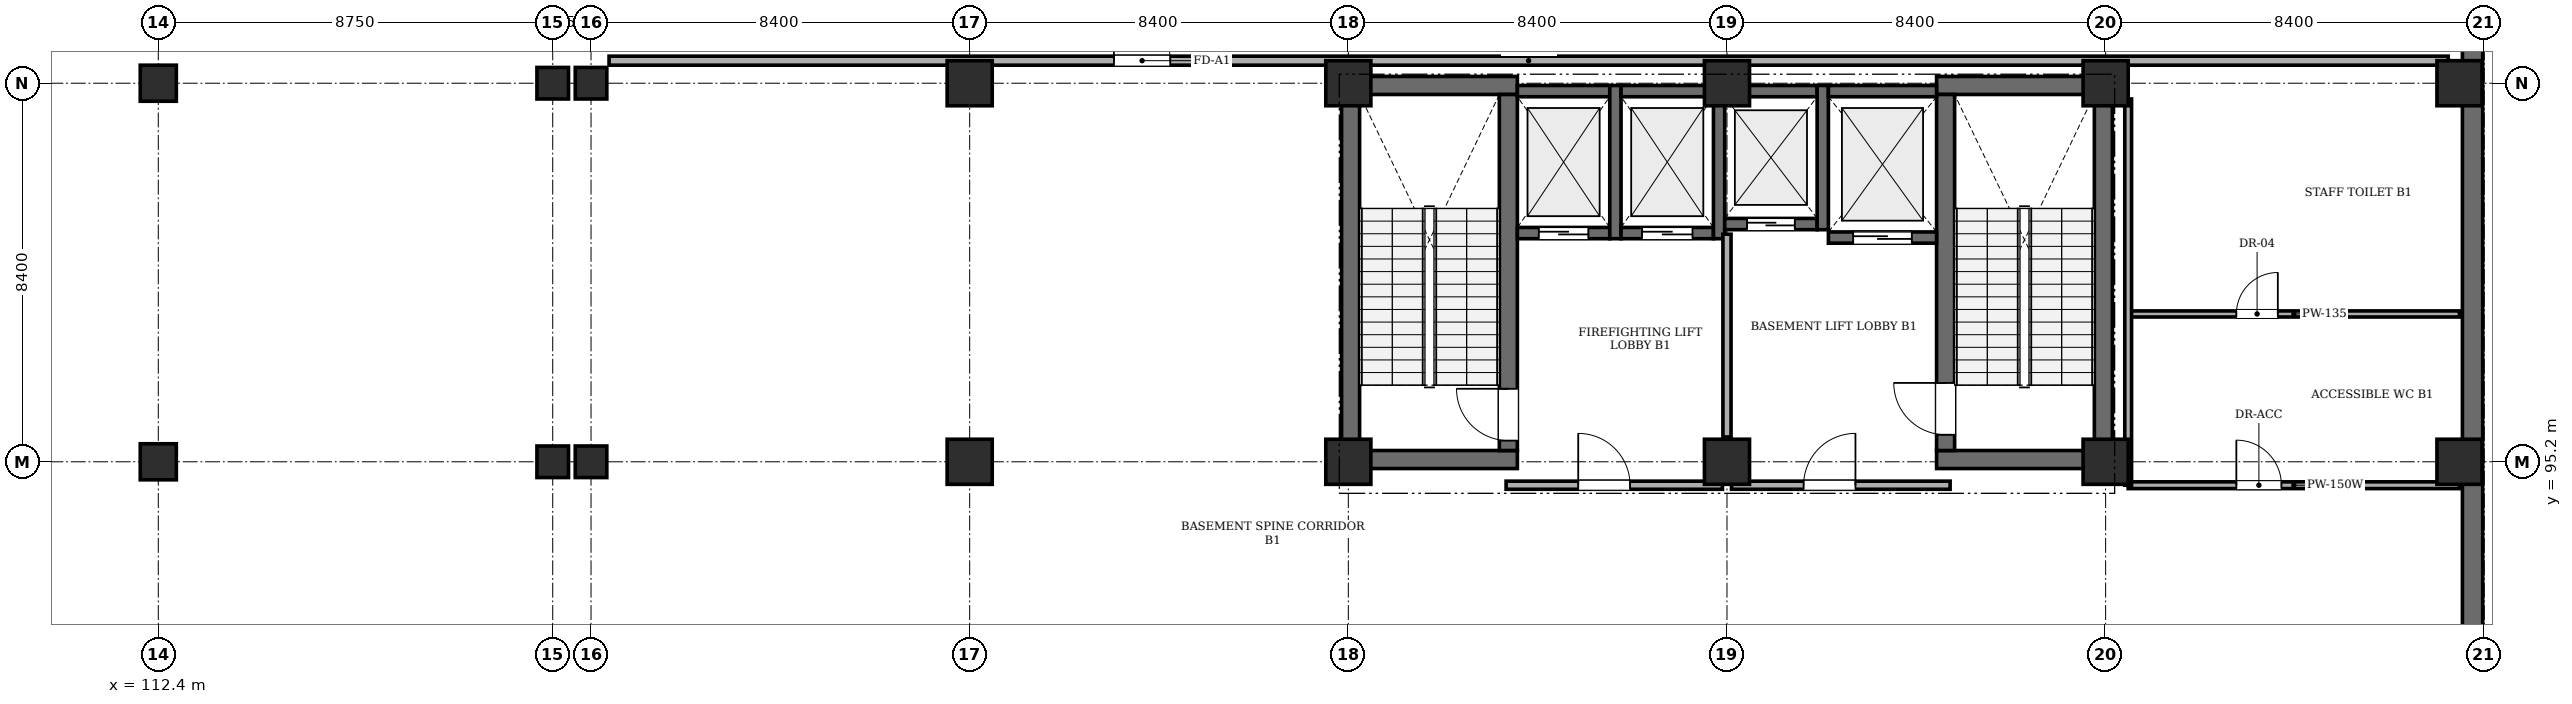
"""IFC4 building model, lengths in metres.
Left out: names, types, materials, properties, quantities, classifications, styles, units other than length and angle.
Written with IfcOpenShell. Run it as: python <this file> out.ifc"""

import sys

from ifc_helpers import new_model, si_unit, direction, frame, frame_2d, origin, origin_2d, place, context, subcontext, project, spatial, rectangle, extrude, element, fill, save


model = new_model("IFC4")
c1 = context("Model", 3, precision=1e-05, world=origin(), true_north=direction((0.0, 1.0)))
c2 = subcontext(c1, "Body", "Model", "MODEL_VIEW")
j1 = project(units=[si_unit("LENGTHUNIT", "METRE"), si_unit("PLANEANGLEUNIT", "RADIAN")], contexts=[c1])
p1 = place(None, origin())
s1 = spatial("IfcSite", under=j1, at=p1, CompositionType="ELEMENT")
p2 = place(p1, origin())
s2 = spatial("IfcBuilding", under=s1, at=p2, CompositionType="ELEMENT")
p3 = place(p2, frame((0.0, 0.0, -4.8)))
s3 = spatial("IfcBuildingStorey", under=s2, at=p3, CompositionType="ELEMENT", Elevation=-4.8)
for number, where, z_axis, x_axis in (
    (1, (112.4, 95.2, 0.0), (0.0, 0.0, 1.0), (1.0, 0.0, 0.0)),
    (2, (112.4, 103.6, 0.0), (0.0, 0.0, 1.0), (1.0, 0.0, 0.0)),
):
    element("IfcColumn", number, at=place(p3, frame(where, z_axis=z_axis, x_axis=x_axis)), inside=s3, PredefinedType="COLUMN", context=c2, shape_type="SweptSolid", body=[
        extrude(rectangle(XDim=0.8, YDim=0.8, at=origin_2d()), origin(), (0.0, 0.0, 1.0), 4.395),
    ])
for number, where, z_axis, x_axis in (
    (3, (121.15, 95.2, 0.0), (0.0, 0.0, 1.0), (1.0, 0.0, 0.0)),
    (4, (121.15, 103.6, 0.0), (0.0, 0.0, 1.0), (1.0, 0.0, 0.0)),
    (5, (122.0, 95.2, 0.0), (0.0, 0.0, 1.0), (1.0, 0.0, 0.0)),
    (6, (122.0, 103.6, 0.0), (0.0, 0.0, 1.0), (1.0, 0.0, 0.0)),
):
    element("IfcColumn", number, at=place(p3, frame(where, z_axis=z_axis, x_axis=x_axis)), inside=s3, PredefinedType="COLUMN", context=c2, shape_type="SweptSolid", body=[
        extrude(rectangle(XDim=0.7, YDim=0.7, at=origin_2d()), origin(), (0.0, 0.0, 1.0), 4.395),
    ])
for number, where, z_axis, x_axis in (
    (7, (130.4, 95.2, 0.0), (0.0, 0.0, 1.0), (1.0, 0.0, 0.0)),
    (8, (130.4, 103.6, 0.0), (0.0, 0.0, 1.0), (1.0, 0.0, 0.0)),
    (9, (138.8, 95.2, 0.0), (0.0, 0.0, 1.0), (1.0, 0.0, 0.0)),
    (10, (138.8, 103.6, 0.0), (0.0, 0.0, 1.0), (1.0, 0.0, 0.0)),
    (11, (147.2, 95.2, 0.0), (0.0, 0.0, 1.0), (1.0, 0.0, 0.0)),
    (12, (147.2, 103.6, 0.0), (0.0, 0.0, 1.0), (1.0, 0.0, 0.0)),
    (13, (155.6, 95.2, 0.0), (0.0, 0.0, 1.0), (1.0, 0.0, 0.0)),
    (14, (155.6, 103.6, 0.0), (0.0, 0.0, 1.0), (1.0, 0.0, 0.0)),
    (15, (163.45, 95.2, 0.0), (0.0, 0.0, 1.0), (1.0, 0.0, 0.0)),
    (16, (163.45, 103.6, 0.0), (0.0, 0.0, 1.0), (1.0, 0.0, 0.0)),
):
    element("IfcColumn", number, at=place(p3, frame(where, z_axis=z_axis, x_axis=x_axis)), inside=s3, PredefinedType="COLUMN", context=c2, shape_type="SweptSolid", body=[
        extrude(rectangle(XDim=1.0, YDim=1.0, at=origin_2d()), origin(), (0.0, 0.0, 1.0), 4.395),
    ])
p4 = place(p3, frame((163.74, 0.26, 0.0), z_axis=(0.0, 0.0, 1.0), x_axis=(0.0, 1.0, 0.0)))
e17 = element("IfcWall", 17, at=p4, inside=s3, PredefinedType="SHEAR", context=c2, shape_type="SweptSolid", body=[
    extrude(rectangle(XDim=111.48, YDim=0.45, at=frame_2d((55.74, 0.0))), origin(), (0.0, 0.0, 1.0), 3.75),
])
for number, where, z_axis, x_axis in (
    (18, (138.65, 95.25, 0.0), (0.0, 0.0, 1.0), (1.0, 0.0, 0.0)),
    (19, (138.65, 103.55, 0.0), (0.0, 0.0, 1.0), (1.0, 0.0, 0.0)),
):
    element("IfcWall", number, at=place(p3, frame(where, z_axis=z_axis, x_axis=x_axis)), inside=s3, PredefinedType="SHEAR", context=c2, shape_type="SweptSolid", body=[
        extrude(rectangle(XDim=3.9, YDim=0.4, at=frame_2d((1.95, 0.0))), origin(), (0.0, 0.0, 1.0), 4.395),
    ])
p5 = place(p3, frame((138.85, 95.45, 0.0), z_axis=(0.0, 0.0, 1.0), x_axis=(0.0, 1.0, 0.0)))
e20 = element("IfcWall", 20, at=p5, inside=s3, PredefinedType="SHEAR", context=c2, shape_type="SweptSolid", body=[
    extrude(rectangle(XDim=7.9, YDim=0.4, at=frame_2d((3.95, 0.0))), origin(), (0.0, 0.0, 1.0), 4.395),
])
p6 = place(p3, frame((142.35, 95.45, 0.0), z_axis=(0.0, 0.0, 1.0), x_axis=(0.0, 1.0, 0.0)))
e21 = element("IfcWall", 21, at=p6, inside=s3, PredefinedType="SHEAR", context=c2, shape_type="SweptSolid", body=[
    extrude(rectangle(XDim=7.9, YDim=0.4, at=frame_2d((3.95, 0.0))), origin(), (0.0, 0.0, 1.0), 4.395),
])
p7 = place(p6, frame((0.22, 0.0, 0.0)))
e22 = element("IfcOpeningElement", 22, at=p7, cuts=e21, PredefinedType="OPENING", context=c2, shape_type="SweptSolid", body=[
    extrude(rectangle(XDim=1.15, YDim=2.15, at=frame_2d((0.575, 1.075))), frame((0.0, 0.21, 0.0), z_axis=(0.0, -1.0, 0.0), x_axis=(1.0, 0.0, 0.0)), (0.0, 0.0, 1.0), 0.42),
])
for number, where, z_axis, x_axis in (
    (23, (151.85, 95.25, 0.0), (0.0, 0.0, 1.0), (1.0, 0.0, 0.0)),
    (24, (151.85, 103.55, 0.0), (0.0, 0.0, 1.0), (1.0, 0.0, 0.0)),
):
    element("IfcWall", number, at=place(p3, frame(where, z_axis=z_axis, x_axis=x_axis)), inside=s3, PredefinedType="SHEAR", context=c2, shape_type="SweptSolid", body=[
        extrude(rectangle(XDim=3.9, YDim=0.4, at=frame_2d((1.95, 0.0))), origin(), (0.0, 0.0, 1.0), 4.395),
    ])
p8 = place(p3, frame((152.05, 95.45, 0.0), z_axis=(0.0, 0.0, 1.0), x_axis=(0.0, 1.0, 0.0)))
e25 = element("IfcWall", 25, at=p8, inside=s3, PredefinedType="SHEAR", context=c2, shape_type="SweptSolid", body=[
    extrude(rectangle(XDim=7.9, YDim=0.4, at=frame_2d((3.95, 0.0))), origin(), (0.0, 0.0, 1.0), 4.395),
])
p9 = place(p8, frame((0.35, 0.0, 0.0)))
e26 = element("IfcOpeningElement", 26, at=p9, cuts=e25, PredefinedType="OPENING", context=c2, shape_type="SweptSolid", body=[
    extrude(rectangle(XDim=1.15, YDim=2.15, at=frame_2d((0.575, 1.075))), frame((0.0, 0.21, 0.0), z_axis=(0.0, -1.0, 0.0), x_axis=(1.0, 0.0, 0.0)), (0.0, 0.0, 1.0), 0.42),
])
p10 = place(p3, frame((155.55, 95.45, 0.0), z_axis=(0.0, 0.0, 1.0), x_axis=(0.0, 1.0, 0.0)))
e27 = element("IfcWall", 27, at=p10, inside=s3, PredefinedType="SHEAR", context=c2, shape_type="SweptSolid", body=[
    extrude(rectangle(XDim=7.9, YDim=0.4, at=frame_2d((3.95, 0.0))), origin(), (0.0, 0.0, 1.0), 4.395),
])
p11 = place(p3, frame((142.55, 100.275, 0.0), z_axis=(0.0, 0.0, 1.0), x_axis=(1.0, 0.0, 0.0)))
e28 = element("IfcWall", 28, at=p11, inside=s3, PredefinedType="SHEAR", context=c2, shape_type="SweptSolid", body=[
    extrude(rectangle(XDim=2.05, YDim=0.25, at=frame_2d((1.025, 0.0))), origin(), (0.0, 0.0, 1.0), 4.395),
])
p12 = place(p11, frame((0.475, 0.0, 0.0)))
e29 = element("IfcOpeningElement", 29, at=p12, cuts=e28, PredefinedType="OPENING", context=c2, shape_type="SweptSolid", body=[
    extrude(rectangle(XDim=1.1, YDim=2.15, at=frame_2d((0.55, 1.075))), frame((0.0, 0.135, 0.0), z_axis=(0.0, -1.0, 0.0), x_axis=(1.0, 0.0, 0.0)), (0.0, 0.0, 1.0), 0.27),
])
p13 = place(p3, frame((142.55, 103.425, 0.0), z_axis=(0.0, 0.0, 1.0), x_axis=(1.0, 0.0, 0.0)))
e30 = element("IfcWall", 30, at=p13, inside=s3, PredefinedType="SHEAR", context=c2, shape_type="SweptSolid", body=[
    extrude(rectangle(XDim=2.05, YDim=0.25, at=frame_2d((1.025, 0.0))), origin(), (0.0, 0.0, 1.0), 4.395),
])
p14 = place(p3, frame((144.725, 100.15, 0.0), z_axis=(0.0, 0.0, 1.0), x_axis=(0.0, 1.0, 0.0)))
e31 = element("IfcWall", 31, at=p14, inside=s3, PredefinedType="SHEAR", context=c2, shape_type="SweptSolid", body=[
    extrude(rectangle(XDim=3.4, YDim=0.25, at=frame_2d((1.7, 0.0))), origin(), (0.0, 0.0, 1.0), 4.395),
])
p15 = place(p3, frame((144.85, 100.275, 0.0), z_axis=(0.0, 0.0, 1.0), x_axis=(1.0, 0.0, 0.0)))
e32 = element("IfcWall", 32, at=p15, inside=s3, PredefinedType="SHEAR", context=c2, shape_type="SweptSolid", body=[
    extrude(rectangle(XDim=2.05, YDim=0.25, at=frame_2d((1.025, 0.0))), origin(), (0.0, 0.0, 1.0), 4.395),
])
p16 = place(p15, frame((0.465, 0.0, 0.0)))
e33 = element("IfcOpeningElement", 33, at=p16, cuts=e32, PredefinedType="OPENING", context=c2, shape_type="SweptSolid", body=[
    extrude(rectangle(XDim=1.12, YDim=2.15, at=frame_2d((0.56, 1.075))), frame((0.0, 0.135, 0.0), z_axis=(0.0, -1.0, 0.0), x_axis=(1.0, 0.0, 0.0)), (0.0, 0.0, 1.0), 0.27),
])
p17 = place(p3, frame((144.85, 103.425, 0.0), z_axis=(0.0, 0.0, 1.0), x_axis=(1.0, 0.0, 0.0)))
e34 = element("IfcWall", 34, at=p17, inside=s3, PredefinedType="SHEAR", context=c2, shape_type="SweptSolid", body=[
    extrude(rectangle(XDim=2.05, YDim=0.25, at=frame_2d((1.025, 0.0))), origin(), (0.0, 0.0, 1.0), 4.395),
])
p18 = place(p3, frame((147.025, 100.15, 0.0), z_axis=(0.0, 0.0, 1.0), x_axis=(0.0, 1.0, 0.0)))
e35 = element("IfcWall", 35, at=p18, inside=s3, PredefinedType="SHEAR", context=c2, shape_type="SweptSolid", body=[
    extrude(rectangle(XDim=3.4, YDim=0.25, at=frame_2d((1.7, 0.0))), origin(), (0.0, 0.0, 1.0), 4.395),
])
p19 = place(p3, frame((147.15, 100.475, 0.0), z_axis=(0.0, 0.0, 1.0), x_axis=(1.0, 0.0, 0.0)))
e36 = element("IfcWall", 36, at=p19, inside=s3, PredefinedType="SHEAR", context=c2, shape_type="SweptSolid", body=[
    extrude(rectangle(XDim=2.05, YDim=0.25, at=frame_2d((1.025, 0.0))), origin(), (0.0, 0.0, 1.0), 4.395),
])
p20 = place(p19, frame((0.495, 0.0, 0.0)))
e37 = element("IfcOpeningElement", 37, at=p20, cuts=e36, PredefinedType="OPENING", context=c2, shape_type="SweptSolid", body=[
    extrude(rectangle(XDim=1.06, YDim=2.15, at=frame_2d((0.53, 1.075))), frame((0.0, 0.135, 0.0), z_axis=(0.0, -1.0, 0.0), x_axis=(1.0, 0.0, 0.0)), (0.0, 0.0, 1.0), 0.27),
])
p21 = place(p3, frame((147.15, 103.425, 0.0), z_axis=(0.0, 0.0, 1.0), x_axis=(1.0, 0.0, 0.0)))
e38 = element("IfcWall", 38, at=p21, inside=s3, PredefinedType="SHEAR", context=c2, shape_type="SweptSolid", body=[
    extrude(rectangle(XDim=2.05, YDim=0.25, at=frame_2d((1.025, 0.0))), origin(), (0.0, 0.0, 1.0), 4.395),
])
p22 = place(p3, frame((149.325, 100.35, 0.0), z_axis=(0.0, 0.0, 1.0), x_axis=(0.0, 1.0, 0.0)))
e39 = element("IfcWall", 39, at=p22, inside=s3, PredefinedType="SHEAR", context=c2, shape_type="SweptSolid", body=[
    extrude(rectangle(XDim=3.2, YDim=0.25, at=frame_2d((1.6, 0.0))), origin(), (0.0, 0.0, 1.0), 4.395),
])
p23 = place(p3, frame((149.45, 100.175, 0.0), z_axis=(0.0, 0.0, 1.0), x_axis=(1.0, 0.0, 0.0)))
e40 = element("IfcWall", 40, at=p23, inside=s3, PredefinedType="SHEAR", context=c2, shape_type="SweptSolid", body=[
    extrude(rectangle(XDim=2.4, YDim=0.25, at=frame_2d((1.2, 0.0))), origin(), (0.0, 0.0, 1.0), 4.395),
])
p24 = place(p23, frame((0.55, 0.0, 0.0)))
e41 = element("IfcOpeningElement", 41, at=p24, cuts=e40, PredefinedType="OPENING", context=c2, shape_type="SweptSolid", body=[
    extrude(rectangle(XDim=1.3, YDim=2.25, at=frame_2d((0.65, 1.125))), frame((0.0, 0.135, 0.0), z_axis=(0.0, -1.0, 0.0), x_axis=(1.0, 0.0, 0.0)), (0.0, 0.0, 1.0), 0.27),
])
p25 = place(p3, frame((149.45, 103.425, 0.0), z_axis=(0.0, 0.0, 1.0), x_axis=(1.0, 0.0, 0.0)))
e42 = element("IfcWall", 42, at=p25, inside=s3, PredefinedType="SHEAR", context=c2, shape_type="SweptSolid", body=[
    extrude(rectangle(XDim=2.4, YDim=0.25, at=frame_2d((1.2, 0.0))), origin(), (0.0, 0.0, 1.0), 4.395),
])
p26 = place(p3, frame((142.3, 94.68, 0.0), z_axis=(0.0, 0.0, 1.0), x_axis=(1.0, 0.0, 0.0)))
e43 = element("IfcWall", 43, at=p26, inside=s3, PredefinedType="STANDARD", context=c2, shape_type="SweptSolid", body=[
    extrude(rectangle(XDim=4.8, YDim=0.18, at=frame_2d((2.4, 0.0))), origin(), (0.0, 0.0, 1.0), 4.395),
])
p27 = place(p26, frame((1.6, 0.0, 0.0)))
e44 = element("IfcOpeningElement", 44, at=p27, cuts=e43, PredefinedType="OPENING", context=c2, shape_type="SweptSolid", body=[
    extrude(rectangle(XDim=1.15, YDim=2.15, at=frame_2d((0.575, 1.075))), frame((0.0, 0.1, 0.0), z_axis=(0.0, -1.0, 0.0), x_axis=(1.0, 0.0, 0.0)), (0.0, 0.0, 1.0), 0.2),
])
p28 = place(p3, frame((147.3, 94.68, 0.0), z_axis=(0.0, 0.0, 1.0), x_axis=(1.0, 0.0, 0.0)))
e45 = element("IfcWall", 45, at=p28, inside=s3, PredefinedType="STANDARD", context=c2, shape_type="SweptSolid", body=[
    extrude(rectangle(XDim=4.85, YDim=0.18, at=frame_2d((2.425, 0.0))), origin(), (0.0, 0.0, 1.0), 4.395),
])
p29 = place(p28, frame((1.6, 0.0, 0.0)))
e46 = element("IfcOpeningElement", 46, at=p29, cuts=e45, PredefinedType="OPENING", context=c2, shape_type="SweptSolid", body=[
    extrude(rectangle(XDim=1.15, YDim=2.15, at=frame_2d((0.575, 1.075))), frame((0.0, 0.1, 0.0), z_axis=(0.0, -1.0, 0.0), x_axis=(1.0, 0.0, 0.0)), (0.0, 0.0, 1.0), 0.2),
])
p30 = place(p3, frame((147.2, 95.75, 0.0), z_axis=(0.0, 0.0, 1.0), x_axis=(0.0, 1.0, 0.0)))
e47 = element("IfcWall", 47, at=p30, inside=s3, PredefinedType="STANDARD", context=c2, shape_type="SweptSolid", body=[
    extrude(rectangle(XDim=4.5, YDim=0.18, at=frame_2d((2.25, 0.0))), origin(), (0.0, 0.0, 1.0), 3.595),
])
p31 = place(p3, frame((156.1, 94.68, 0.0), z_axis=(0.0, 0.0, 1.0), x_axis=(1.0, 0.0, 0.0)))
e48 = element("IfcWall", 48, at=p31, inside=s3, PredefinedType="PARTITIONING", context=c2, shape_type="SweptSolid", body=[
    extrude(rectangle(XDim=7.35, YDim=0.15, at=frame_2d((3.675, 0.0))), origin(), (0.0, 0.0, 1.0), 4.395),
])
p32 = place(p31, frame((2.4, 0.0, 0.0)))
e49 = element("IfcOpeningElement", 49, at=p32, cuts=e48, PredefinedType="OPENING", context=c2, shape_type="SweptSolid", body=[
    extrude(rectangle(XDim=1.0, YDim=2.12, at=frame_2d((0.5, 1.06))), frame((0.0, 0.085, 0.0), z_axis=(0.0, -1.0, 0.0), x_axis=(1.0, 0.0, 0.0)), (0.0, 0.0, 1.0), 0.17),
])
p33 = place(p3, frame((156.1, 98.48, 0.0), z_axis=(0.0, 0.0, 1.0), x_axis=(1.0, 0.0, 0.0)))
e50 = element("IfcWall", 50, at=p33, inside=s3, PredefinedType="PARTITIONING", context=c2, shape_type="SweptSolid", body=[
    extrude(rectangle(XDim=7.35, YDim=0.135, at=frame_2d((3.675, 0.0))), origin(), (0.0, 0.0, 1.0), 4.395),
])
p34 = place(p33, frame((2.4, 0.0, 0.0)))
e51 = element("IfcOpeningElement", 51, at=p34, cuts=e50, PredefinedType="OPENING", context=c2, shape_type="SweptSolid", body=[
    extrude(rectangle(XDim=0.92, YDim=2.1, at=frame_2d((0.46, 1.05))), frame((0.0, 0.077, 0.0), z_axis=(0.0, -1.0, 0.0), x_axis=(1.0, 0.0, 0.0)), (0.0, 0.0, 1.0), 0.155),
])
p35 = place(p3, frame((156.1, 94.68, 0.0), z_axis=(0.0, 0.0, 1.0), x_axis=(0.0, 1.0, 0.0)))
e52 = element("IfcWall", 52, at=p35, inside=s3, PredefinedType="PARTITIONING", context=c2, shape_type="SweptSolid", body=[
    extrude(rectangle(XDim=8.57, YDim=0.15, at=frame_2d((4.285, 0.0))), origin(), (0.0, 0.0, 1.0), 4.395),
])
p36 = place(p3, frame((122.4, 104.1, 0.0), z_axis=(0.0, 0.0, 1.0), x_axis=(1.0, 0.0, 0.0)))
e53 = element("IfcWall", 53, at=p36, inside=s3, PredefinedType="SOLIDWALL", context=c2, shape_type="SweptSolid", body=[
    extrude(rectangle(XDim=40.8, YDim=0.2, at=frame_2d((20.4, 0.0))), origin(), (0.0, 0.0, 1.0), 4.395),
])
p37 = place(p36, frame((11.2, 0.0, 0.0)))
e54 = element("IfcOpeningElement", 54, at=p37, cuts=e53, PredefinedType="OPENING", context=c2, shape_type="SweptSolid", body=[
    extrude(rectangle(XDim=1.25, YDim=2.2, at=frame_2d((0.625, 1.1))), frame((0.0, 0.11, 0.0), z_axis=(0.0, -1.0, 0.0), x_axis=(1.0, 0.0, 0.0)), (0.0, 0.0, 1.0), 0.22),
])
p38 = place(p27, origin())
e55 = element("IfcDoor", 55, at=p38, inside=s3, OperationType="SINGLE_SWING_LEFT", PredefinedType="DOOR", context=c2, shape_type="SweptSolid", body=[
    extrude(rectangle(XDim=1.15, YDim=2.15, at=frame_2d((0.575, 1.075))), frame((0.0, 0.025, 0.0), z_axis=(0.0, -1.0, 0.0), x_axis=(1.0, 0.0, 0.0)), (0.0, 0.0, 1.0), 0.05),
])
fill(e44, e55)
p39 = place(p29, origin())
e56 = element("IfcDoor", 56, at=p39, inside=s3, OperationType="SINGLE_SWING_RIGHT", PredefinedType="DOOR", context=c2, shape_type="SweptSolid", body=[
    extrude(rectangle(XDim=1.15, YDim=2.15, at=frame_2d((0.575, 1.075))), frame((0.0, 0.025, 0.0), z_axis=(0.0, -1.0, 0.0), x_axis=(1.0, 0.0, 0.0)), (0.0, 0.0, 1.0), 0.05),
])
fill(e46, e56)
p40 = place(p32, origin())
e57 = element("IfcDoor", 57, at=p40, inside=s3, OperationType="SINGLE_SWING_LEFT", PredefinedType="DOOR", context=c2, shape_type="SweptSolid", body=[
    extrude(rectangle(XDim=1.0, YDim=2.12, at=frame_2d((0.5, 1.06))), frame((0.0, 0.025, 0.0), z_axis=(0.0, -1.0, 0.0), x_axis=(1.0, 0.0, 0.0)), (0.0, 0.0, 1.0), 0.05),
])
fill(e49, e57)
p41 = place(p34, origin())
e58 = element("IfcDoor", 58, at=p41, inside=s3, OperationType="SINGLE_SWING_RIGHT", PredefinedType="DOOR", context=c2, shape_type="SweptSolid", body=[
    extrude(rectangle(XDim=0.92, YDim=2.1, at=frame_2d((0.46, 1.05))), frame((0.0, 0.025, 0.0), z_axis=(0.0, -1.0, 0.0), x_axis=(1.0, 0.0, 0.0)), (0.0, 0.0, 1.0), 0.05),
])
fill(e51, e58)
p42 = place(p37, origin())
e59 = element("IfcDoor", 59, at=p42, inside=s3, OperationType="SINGLE_SWING_LEFT", PredefinedType="DOOR", context=c2, shape_type="SweptSolid", body=[
    extrude(rectangle(XDim=1.25, YDim=2.2, at=frame_2d((0.625, 1.1))), frame((0.0, 0.025, 0.0), z_axis=(0.0, -1.0, 0.0), x_axis=(1.0, 0.0, 0.0)), (0.0, 0.0, 1.0), 0.05),
])
fill(e54, e59)
p43 = place(p7, origin())
e60 = element("IfcDoor", 60, at=p43, inside=s3, OperationType="SINGLE_SWING_RIGHT", PredefinedType="DOOR", context=c2, shape_type="SweptSolid", body=[
    extrude(rectangle(XDim=1.15, YDim=2.15, at=frame_2d((0.575, 1.075))), frame((0.0, 0.025, 0.0), z_axis=(0.0, -1.0, 0.0), x_axis=(1.0, 0.0, 0.0)), (0.0, 0.0, 1.0), 0.05),
])
fill(e22, e60)
p44 = place(p9, origin())
e61 = element("IfcDoor", 61, at=p44, inside=s3, OperationType="SINGLE_SWING_RIGHT", PredefinedType="DOOR", context=c2, shape_type="SweptSolid", body=[
    extrude(rectangle(XDim=1.15, YDim=2.15, at=frame_2d((0.575, 1.075))), frame((0.0, 0.025, 0.0), z_axis=(0.0, -1.0, 0.0), x_axis=(1.0, 0.0, 0.0)), (0.0, 0.0, 1.0), 0.05),
])
fill(e26, e61)
p45 = place(p12, origin())
e62 = element("IfcDoor", 62, at=p45, inside=s3, OperationType="SLIDING_TO_LEFT", PredefinedType="DOOR", context=c2, shape_type="SweptSolid", body=[
    extrude(rectangle(XDim=1.1, YDim=2.15, at=frame_2d((0.55, 1.075))), frame((0.0, 0.025, 0.0), z_axis=(0.0, -1.0, 0.0), x_axis=(1.0, 0.0, 0.0)), (0.0, 0.0, 1.0), 0.05),
])
fill(e29, e62)
p46 = place(p16, origin())
e63 = element("IfcDoor", 63, at=p46, inside=s3, OperationType="SLIDING_TO_LEFT", PredefinedType="DOOR", context=c2, shape_type="SweptSolid", body=[
    extrude(rectangle(XDim=1.12, YDim=2.15, at=frame_2d((0.56, 1.075))), frame((0.0, 0.025, 0.0), z_axis=(0.0, -1.0, 0.0), x_axis=(1.0, 0.0, 0.0)), (0.0, 0.0, 1.0), 0.05),
])
fill(e33, e63)
p47 = place(p20, origin())
e64 = element("IfcDoor", 64, at=p47, inside=s3, OperationType="SLIDING_TO_LEFT", PredefinedType="DOOR", context=c2, shape_type="SweptSolid", body=[
    extrude(rectangle(XDim=1.06, YDim=2.15, at=frame_2d((0.53, 1.075))), frame((0.0, 0.025, 0.0), z_axis=(0.0, -1.0, 0.0), x_axis=(1.0, 0.0, 0.0)), (0.0, 0.0, 1.0), 0.05),
])
fill(e37, e64)
p48 = place(p24, origin())
e65 = element("IfcDoor", 65, at=p48, inside=s3, OperationType="SLIDING_TO_LEFT", PredefinedType="DOOR", context=c2, shape_type="SweptSolid", body=[
    extrude(rectangle(XDim=1.3, YDim=2.25, at=frame_2d((0.65, 1.125))), frame((0.0, 0.025, 0.0), z_axis=(0.0, -1.0, 0.0), x_axis=(1.0, 0.0, 0.0)), (0.0, 0.0, 1.0), 0.05),
])
fill(e41, e65)
save(model, sys.argv[1])
